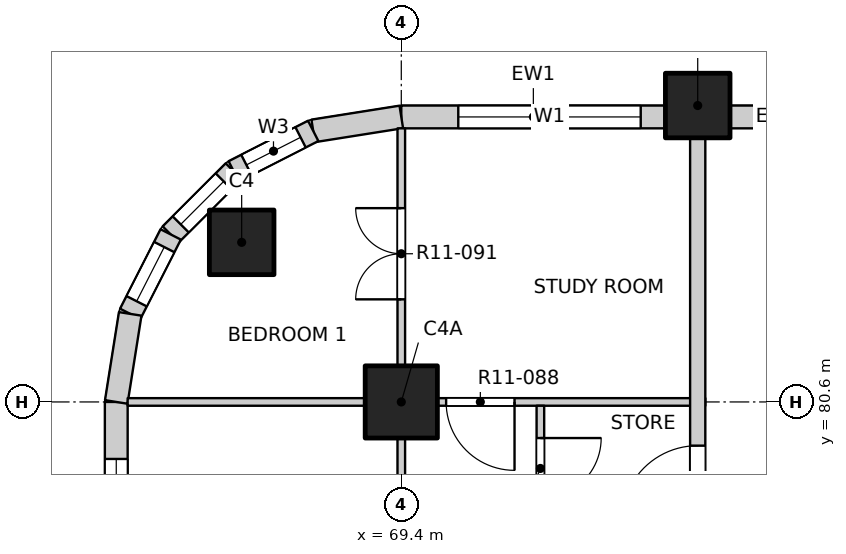
"""IFC4 building model, lengths in metres.
Left out: names, types, materials, properties, quantities, classifications, styles, units other than length and angle.
Written with IfcOpenShell. Run it as: python <this file> out.ifc"""

import sys

from ifc_helpers import new_model, si_unit, direction, frame, frame_2d, origin, origin_2d, place, context, subcontext, project, spatial, rectangle, extrude, element, fill, save


model = new_model("IFC4")
c1 = context("Model", 3, precision=1e-05, world=origin(), true_north=direction((0.0, 1.0)))
c2 = subcontext(c1, "Body", "Model", "MODEL_VIEW")
j1 = project(units=[si_unit("LENGTHUNIT", "METRE"), si_unit("PLANEANGLEUNIT", "RADIAN")], contexts=[c1])
p1 = place(None, origin())
s1 = spatial("IfcSite", under=j1, at=p1, CompositionType="ELEMENT")
p2 = place(p1, origin())
s2 = spatial("IfcBuilding", under=s1, at=p2, CompositionType="ELEMENT")
p3 = place(p2, frame((0.0, 0.0, 130.5)))
s3 = spatial("IfcBuildingStorey", under=s2, at=p3, CompositionType="ELEMENT", Elevation=130.5)
for number, where, z_axis, x_axis in (
    (1, (67.3, 82.7, -0.25), (0.0, 0.0, 1.0), (1.0, 0.0, 0.0)),
    (2, (73.3, 84.5, -0.25), (0.0, 0.0, 1.0), (1.0, 0.0, 0.0)),
):
    element("IfcColumn", number, at=place(p3, frame(where, z_axis=z_axis, x_axis=x_axis)), inside=s3, PredefinedType="COLUMN", context=c2, shape_type="SweptSolid", body=[
        extrude(rectangle(XDim=0.85, YDim=0.85, at=origin_2d()), origin(), (0.0, 0.0, 1.0), 3.4),
    ])
p4 = place(p3, frame((69.4, 80.6, -0.25), z_axis=(0.0, 0.0, 1.0), x_axis=(1.0, 0.0, 0.0)))
e3 = element("IfcColumn", 3, at=p4, inside=s3, PredefinedType="COLUMN", context=c2, shape_type="SweptSolid", body=[
    extrude(rectangle(XDim=0.95, YDim=0.95, at=origin_2d()), origin(), (0.0, 0.0, 1.0), 3.4),
])
p5 = place(p3, frame((69.4, 84.35, 0.0), z_axis=(0.0, 0.0, 1.0), x_axis=(1.0, 0.0, 0.0)))
e4 = element("IfcWall", 4, at=p5, inside=s3, PredefinedType="SOLIDWALL", context=c2, shape_type="SweptSolid", body=[
    extrude(rectangle(XDim=3.475, YDim=0.3, at=frame_2d((1.738, 0.0))), origin(), (0.0, 0.0, 1.0), 2.7),
])
p6 = place(p5, frame((0.75, 0.0, 0.9)))
e5 = element("IfcOpeningElement", 5, at=p6, cuts=e4, PredefinedType="OPENING", context=c2, shape_type="SweptSolid", body=[
    extrude(rectangle(XDim=2.4, YDim=1.8, at=frame_2d((1.2, 0.9))), frame((0.0, 0.16, 0.0), z_axis=(0.0, -1.0, 0.0), x_axis=(1.0, 0.0, 0.0)), (0.0, 0.0, 1.0), 0.32),
])
p7 = place(p3, frame((73.725, 84.35, 0.0), z_axis=(0.0, 0.0, 1.0), x_axis=(1.0, 0.0, 0.0)))
e6 = element("IfcWall", 6, at=p7, inside=s3, PredefinedType="SOLIDWALL", context=c2, shape_type="SweptSolid", body=[
    extrude(rectangle(XDim=1.25, YDim=0.3, at=frame_2d((0.625, 0.0))), origin(), (0.0, 0.0, 1.0), 2.7),
])
p8 = place(p3, frame((65.65, 77.125, 0.0), z_axis=(0.0, 0.0, 1.0), x_axis=(0.0, 1.0, 0.0)))
e7 = element("IfcWall", 7, at=p8, inside=s3, PredefinedType="SOLIDWALL", context=c2, shape_type="SweptSolid", body=[
    extrude(rectangle(XDim=3.475, YDim=0.3, at=frame_2d((1.738, 0.0))), origin(), (0.0, 0.0, 1.0), 2.7),
])
p9 = place(p8, frame((0.325, 0.0, 0.9)))
e8 = element("IfcOpeningElement", 8, at=p9, cuts=e7, PredefinedType="OPENING", context=c2, shape_type="SweptSolid", body=[
    extrude(rectangle(XDim=2.4, YDim=1.8, at=frame_2d((1.2, 0.9))), frame((0.0, 0.16, 0.0), z_axis=(0.0, -1.0, 0.0), x_axis=(1.0, 0.0, 0.0)), (0.0, 0.0, 1.0), 0.32),
])
p10 = place(p3, frame((69.4, 84.35, 0.0), z_axis=(0.0, 0.0, 1.0), x_axis=(-0.987678452879, -0.156496880861, 0.0)))
e9 = element("IfcWall", 9, at=p10, inside=s3, PredefinedType="SOLIDWALL", context=c2, shape_type="SweptSolid", body=[
    extrude(rectangle(XDim=1.173, YDim=0.3, at=frame_2d((0.586, 0.0))), origin(), (0.0, 0.0, 1.0), 2.7),
])
p11 = place(p3, frame((68.241, 84.167, 0.0), z_axis=(0.0, 0.0, 1.0), x_axis=(-0.890988677504, -0.454025524128, 0.0)))
e10 = element("IfcWall", 10, at=p11, inside=s3, PredefinedType="SOLIDWALL", context=c2, shape_type="SweptSolid", body=[
    extrude(rectangle(XDim=1.173, YDim=0.3, at=frame_2d((0.587, 0.0))), origin(), (0.0, 0.0, 1.0), 2.7),
])
p12 = place(p11, frame((0.187, 0.0, 0.9)))
e11 = element("IfcOpeningElement", 11, at=p12, cuts=e10, PredefinedType="OPENING", context=c2, shape_type="SweptSolid", body=[
    extrude(rectangle(XDim=0.8, YDim=1.2, at=frame_2d((0.4, 0.6))), frame((0.0, 0.16, 0.0), z_axis=(0.0, -1.0, 0.0), x_axis=(1.0, 0.0, 0.0)), (0.0, 0.0, 1.0), 0.32),
])
p13 = place(p3, frame((67.196, 83.634, 0.0), z_axis=(0.0, 0.0, 1.0), x_axis=(-0.707106781187, -0.707106781187, 0.0)))
e12 = element("IfcWall", 12, at=p13, inside=s3, PredefinedType="SOLIDWALL", context=c2, shape_type="SweptSolid", body=[
    extrude(rectangle(XDim=1.173, YDim=0.3, at=frame_2d((0.586, 0.0))), origin(), (0.0, 0.0, 1.0), 2.7),
])
p14 = place(p13, frame((0.187, 0.0, 0.9)))
e13 = element("IfcOpeningElement", 13, at=p14, cuts=e12, PredefinedType="OPENING", context=c2, shape_type="SweptSolid", body=[
    extrude(rectangle(XDim=0.8, YDim=1.2, at=frame_2d((0.4, 0.6))), frame((0.0, 0.16, 0.0), z_axis=(0.0, -1.0, 0.0), x_axis=(1.0, 0.0, 0.0)), (0.0, 0.0, 1.0), 0.32),
])
p15 = place(p3, frame((66.366, 82.804, 0.0), z_axis=(0.0, 0.0, 1.0), x_axis=(-0.454025524128, -0.890988677504, 0.0)))
e14 = element("IfcWall", 14, at=p15, inside=s3, PredefinedType="SOLIDWALL", context=c2, shape_type="SweptSolid", body=[
    extrude(rectangle(XDim=1.173, YDim=0.3, at=frame_2d((0.587, 0.0))), origin(), (0.0, 0.0, 1.0), 2.7),
])
p16 = place(p15, frame((0.187, 0.0, 0.9)))
e15 = element("IfcOpeningElement", 15, at=p16, cuts=e14, PredefinedType="OPENING", context=c2, shape_type="SweptSolid", body=[
    extrude(rectangle(XDim=0.8, YDim=1.2, at=frame_2d((0.4, 0.6))), frame((0.0, 0.16, 0.0), z_axis=(0.0, -1.0, 0.0), x_axis=(1.0, 0.0, 0.0)), (0.0, 0.0, 1.0), 0.32),
])
p17 = place(p3, frame((65.833, 81.759, 0.0), z_axis=(0.0, 0.0, 1.0), x_axis=(-0.156496880861, -0.987678452879, 0.0)))
e16 = element("IfcWall", 16, at=p17, inside=s3, PredefinedType="SOLIDWALL", context=c2, shape_type="SweptSolid", body=[
    extrude(rectangle(XDim=1.173, YDim=0.3, at=frame_2d((0.586, 0.0))), origin(), (0.0, 0.0, 1.0), 2.7),
])
p18 = place(p3, frame((65.8, 80.6, 0.0), z_axis=(0.0, 0.0, 1.0), x_axis=(1.0, 0.0, 0.0)))
e17 = element("IfcWall", 17, at=p18, inside=s3, PredefinedType="PARTITIONING", context=c2, shape_type="SweptSolid", body=[
    extrude(rectangle(XDim=7.6, YDim=0.1, at=frame_2d((3.8, 0.0))), origin(), (0.0, 0.0, 1.0), 3.15),
])
p19 = place(p18, frame((4.19, 0.0, 0.0)))
e18 = element("IfcOpeningElement", 18, at=p19, cuts=e17, PredefinedType="OPENING", context=c2, shape_type="SweptSolid", body=[
    extrude(rectangle(XDim=0.9, YDim=2.1, at=frame_2d((0.45, 1.05))), frame((0.0, 0.06, 0.0), z_axis=(0.0, -1.0, 0.0), x_axis=(1.0, 0.0, 0.0)), (0.0, 0.0, 1.0), 0.12),
])
p20 = place(p3, frame((69.4, 45.8, 0.0), z_axis=(0.0, 0.0, 1.0), x_axis=(0.0, 1.0, 0.0)))
e19 = element("IfcWall", 19, at=p20, inside=s3, PredefinedType="PARTITIONING", context=c2, shape_type="SweptSolid", body=[
    extrude(rectangle(XDim=38.4, YDim=0.1, at=frame_2d((19.2, 0.0))), origin(), (0.0, 0.0, 1.0), 3.15),
])
p21 = place(p20, frame((1.05, 0.0, 0.0)))
e20 = element("IfcOpeningElement", 20, at=p21, cuts=e19, PredefinedType="OPENING", context=c2, shape_type="SweptSolid", body=[
    extrude(rectangle(XDim=1.2, YDim=2.1, at=frame_2d((0.6, 1.05))), frame((0.0, 0.06, 0.0), z_axis=(0.0, -1.0, 0.0), x_axis=(1.0, 0.0, 0.0)), (0.0, 0.0, 1.0), 0.12),
])
p22 = place(p20, frame((6.9, 0.0, 0.0)))
e21 = element("IfcOpeningElement", 21, at=p22, cuts=e19, PredefinedType="OPENING", context=c2, shape_type="SweptSolid", body=[
    extrude(rectangle(XDim=1.2, YDim=2.1, at=frame_2d((0.6, 1.05))), frame((0.0, 0.06, 0.0), z_axis=(0.0, -1.0, 0.0), x_axis=(1.0, 0.0, 0.0)), (0.0, 0.0, 1.0), 0.12),
])
p23 = place(p20, frame((12.9, 0.0, 0.0)))
e22 = element("IfcOpeningElement", 22, at=p23, cuts=e19, PredefinedType="OPENING", context=c2, shape_type="SweptSolid", body=[
    extrude(rectangle(XDim=0.9, YDim=2.1, at=frame_2d((0.45, 1.05))), frame((0.0, 0.06, 0.0), z_axis=(0.0, -1.0, 0.0), x_axis=(1.0, 0.0, 0.0)), (0.0, 0.0, 1.0), 0.12),
])
p24 = place(p20, frame((19.775, 0.0, 0.0)))
e23 = element("IfcOpeningElement", 23, at=p24, cuts=e19, PredefinedType="OPENING", context=c2, shape_type="SweptSolid", body=[
    extrude(rectangle(XDim=1.2, YDim=2.1, at=frame_2d((0.6, 1.05))), frame((0.0, 0.06, 0.0), z_axis=(0.0, -1.0, 0.0), x_axis=(1.0, 0.0, 0.0)), (0.0, 0.0, 1.0), 0.12),
])
p25 = place(p20, frame((24.6, 0.0, 0.0)))
e24 = element("IfcOpeningElement", 24, at=p25, cuts=e19, PredefinedType="OPENING", context=c2, shape_type="SweptSolid", body=[
    extrude(rectangle(XDim=0.9, YDim=2.1, at=frame_2d((0.45, 1.05))), frame((0.0, 0.06, 0.0), z_axis=(0.0, -1.0, 0.0), x_axis=(1.0, 0.0, 0.0)), (0.0, 0.0, 1.0), 0.12),
])
p26 = place(p20, frame((30.3, 0.0, 0.0)))
e25 = element("IfcOpeningElement", 25, at=p26, cuts=e19, PredefinedType="OPENING", context=c2, shape_type="SweptSolid", body=[
    extrude(rectangle(XDim=1.2, YDim=2.1, at=frame_2d((0.6, 1.05))), frame((0.0, 0.06, 0.0), z_axis=(0.0, -1.0, 0.0), x_axis=(1.0, 0.0, 0.0)), (0.0, 0.0, 1.0), 0.12),
])
p27 = place(p20, frame((36.15, 0.0, 0.0)))
e26 = element("IfcOpeningElement", 26, at=p27, cuts=e19, PredefinedType="OPENING", context=c2, shape_type="SweptSolid", body=[
    extrude(rectangle(XDim=1.2, YDim=2.1, at=frame_2d((0.6, 1.05))), frame((0.0, 0.06, 0.0), z_axis=(0.0, -1.0, 0.0), x_axis=(1.0, 0.0, 0.0)), (0.0, 0.0, 1.0), 0.12),
])
p28 = place(p3, frame((71.23, 78.9, 0.0), z_axis=(0.0, 0.0, 1.0), x_axis=(0.0, 1.0, 0.0)))
e27 = element("IfcWall", 27, at=p28, inside=s3, PredefinedType="PARTITIONING", context=c2, shape_type="SweptSolid", body=[
    extrude(rectangle(XDim=1.65, YDim=0.1, at=frame_2d((0.825, 0.0))), origin(), (0.0, 0.0, 1.0), 3.15),
])
p29 = place(p28, frame((0.425, 0.0, 0.0)))
e28 = element("IfcOpeningElement", 28, at=p29, cuts=e27, PredefinedType="OPENING", context=c2, shape_type="SweptSolid", body=[
    extrude(rectangle(XDim=0.8, YDim=2.1, at=frame_2d((0.4, 1.05))), frame((0.0, 0.06, 0.0), z_axis=(0.0, -1.0, 0.0), x_axis=(1.0, 0.0, 0.0)), (0.0, 0.0, 1.0), 0.12),
])
p30 = place(p3, frame((73.3, 53.4, 0.0), z_axis=(0.0, 0.0, 1.0), x_axis=(0.0, 1.0, 0.0)))
e29 = element("IfcWall", 29, at=p30, inside=s3, PredefinedType="PARTITIONING", context=c2, shape_type="SweptSolid", body=[
    extrude(rectangle(XDim=30.8, YDim=0.2, at=frame_2d((15.4, 0.0))), origin(), (0.0, 0.0, 1.0), 3.15),
])
p31 = place(p30, frame((2.875, 0.0, 0.0)))
e30 = element("IfcOpeningElement", 30, at=p31, cuts=e29, PredefinedType="OPENING", context=c2, shape_type="SweptSolid", body=[
    extrude(rectangle(XDim=1.0, YDim=2.1, at=frame_2d((0.5, 1.05))), frame((0.0, 0.11, 0.0), z_axis=(0.0, -1.0, 0.0), x_axis=(1.0, 0.0, 0.0)), (0.0, 0.0, 1.0), 0.22),
])
p32 = place(p30, frame((11.225, 0.0, 0.0)))
e31 = element("IfcOpeningElement", 31, at=p32, cuts=e29, PredefinedType="OPENING", context=c2, shape_type="SweptSolid", body=[
    extrude(rectangle(XDim=1.0, YDim=2.1, at=frame_2d((0.5, 1.05))), frame((0.0, 0.11, 0.0), z_axis=(0.0, -1.0, 0.0), x_axis=(1.0, 0.0, 0.0)), (0.0, 0.0, 1.0), 0.22),
])
p33 = place(p30, frame((25.625, 0.0, 0.0)))
e32 = element("IfcOpeningElement", 32, at=p33, cuts=e29, PredefinedType="OPENING", context=c2, shape_type="SweptSolid", body=[
    extrude(rectangle(XDim=1.0, YDim=2.1, at=frame_2d((0.5, 1.05))), frame((0.0, 0.11, 0.0), z_axis=(0.0, -1.0, 0.0), x_axis=(1.0, 0.0, 0.0)), (0.0, 0.0, 1.0), 0.22),
])
p34 = place(p6, origin())
e33 = element("IfcWindow", 33, at=p34, inside=s3, PartitioningType="DOUBLE_PANEL_VERTICAL", PredefinedType="WINDOW", context=c2, shape_type="SweptSolid", body=[
    extrude(rectangle(XDim=2.4, YDim=1.8, at=frame_2d((1.2, 0.9))), frame((0.0, 0.03, 0.0), z_axis=(0.0, -1.0, 0.0), x_axis=(1.0, 0.0, 0.0)), (0.0, 0.0, 1.0), 0.06),
])
fill(e5, e33)
p35 = place(p9, origin())
e34 = element("IfcWindow", 34, at=p35, inside=s3, PartitioningType="DOUBLE_PANEL_VERTICAL", PredefinedType="WINDOW", context=c2, shape_type="SweptSolid", body=[
    extrude(rectangle(XDim=2.4, YDim=1.8, at=frame_2d((1.2, 0.9))), frame((0.0, 0.03, 0.0), z_axis=(0.0, -1.0, 0.0), x_axis=(1.0, 0.0, 0.0)), (0.0, 0.0, 1.0), 0.06),
])
fill(e8, e34)
p36 = place(p12, origin())
e35 = element("IfcWindow", 35, at=p36, inside=s3, PartitioningType="SINGLE_PANEL", PredefinedType="WINDOW", context=c2, shape_type="SweptSolid", body=[
    extrude(rectangle(XDim=0.8, YDim=1.2, at=frame_2d((0.4, 0.6))), frame((0.0, 0.03, 0.0), z_axis=(0.0, -1.0, 0.0), x_axis=(1.0, 0.0, 0.0)), (0.0, 0.0, 1.0), 0.06),
])
fill(e11, e35)
p37 = place(p14, origin())
e36 = element("IfcWindow", 36, at=p37, inside=s3, PartitioningType="SINGLE_PANEL", PredefinedType="WINDOW", context=c2, shape_type="SweptSolid", body=[
    extrude(rectangle(XDim=0.8, YDim=1.2, at=frame_2d((0.4, 0.6))), frame((0.0, 0.03, 0.0), z_axis=(0.0, -1.0, 0.0), x_axis=(1.0, 0.0, 0.0)), (0.0, 0.0, 1.0), 0.06),
])
fill(e13, e36)
p38 = place(p16, origin())
e37 = element("IfcWindow", 37, at=p38, inside=s3, PartitioningType="SINGLE_PANEL", PredefinedType="WINDOW", context=c2, shape_type="SweptSolid", body=[
    extrude(rectangle(XDim=0.8, YDim=1.2, at=frame_2d((0.4, 0.6))), frame((0.0, 0.03, 0.0), z_axis=(0.0, -1.0, 0.0), x_axis=(1.0, 0.0, 0.0)), (0.0, 0.0, 1.0), 0.06),
])
fill(e15, e37)
p39 = place(p33, origin())
e38 = element("IfcDoor", 38, at=p39, inside=s3, OperationType="SINGLE_SWING_RIGHT", PredefinedType="DOOR", context=c2, shape_type="SweptSolid", body=[
    extrude(rectangle(XDim=1.0, YDim=2.1, at=frame_2d((0.5, 1.05))), frame((0.0, 0.025, 0.0), z_axis=(0.0, -1.0, 0.0), x_axis=(1.0, 0.0, 0.0)), (0.0, 0.0, 1.0), 0.05),
])
fill(e32, e38)
p40 = place(p29, origin())
e39 = element("IfcDoor", 39, at=p40, inside=s3, OperationType="SINGLE_SWING_LEFT", PredefinedType="DOOR", context=c2, shape_type="SweptSolid", body=[
    extrude(rectangle(XDim=0.8, YDim=2.1, at=frame_2d((0.4, 1.05))), frame((0.0, 0.025, 0.0), z_axis=(0.0, -1.0, 0.0), x_axis=(1.0, 0.0, 0.0)), (0.0, 0.0, 1.0), 0.05),
])
fill(e28, e39)
p41 = place(p19, origin())
e40 = element("IfcDoor", 40, at=p41, inside=s3, OperationType="SINGLE_SWING_LEFT", PredefinedType="DOOR", context=c2, shape_type="SweptSolid", body=[
    extrude(rectangle(XDim=0.9, YDim=2.1, at=frame_2d((0.45, 1.05))), frame((0.0, 0.025, 0.0), z_axis=(0.0, -1.0, 0.0), x_axis=(1.0, 0.0, 0.0)), (0.0, 0.0, 1.0), 0.05),
])
fill(e18, e40)
p42 = place(p27, origin())
e41 = element("IfcDoor", 41, at=p42, inside=s3, OperationType="DOUBLE_DOOR_SINGLE_SWING", PredefinedType="DOOR", context=c2, shape_type="SweptSolid", body=[
    extrude(rectangle(XDim=1.2, YDim=2.1, at=frame_2d((0.6, 1.05))), frame((0.0, 0.025, 0.0), z_axis=(0.0, -1.0, 0.0), x_axis=(1.0, 0.0, 0.0)), (0.0, 0.0, 1.0), 0.05),
])
fill(e26, e41)
save(model, sys.argv[1])
